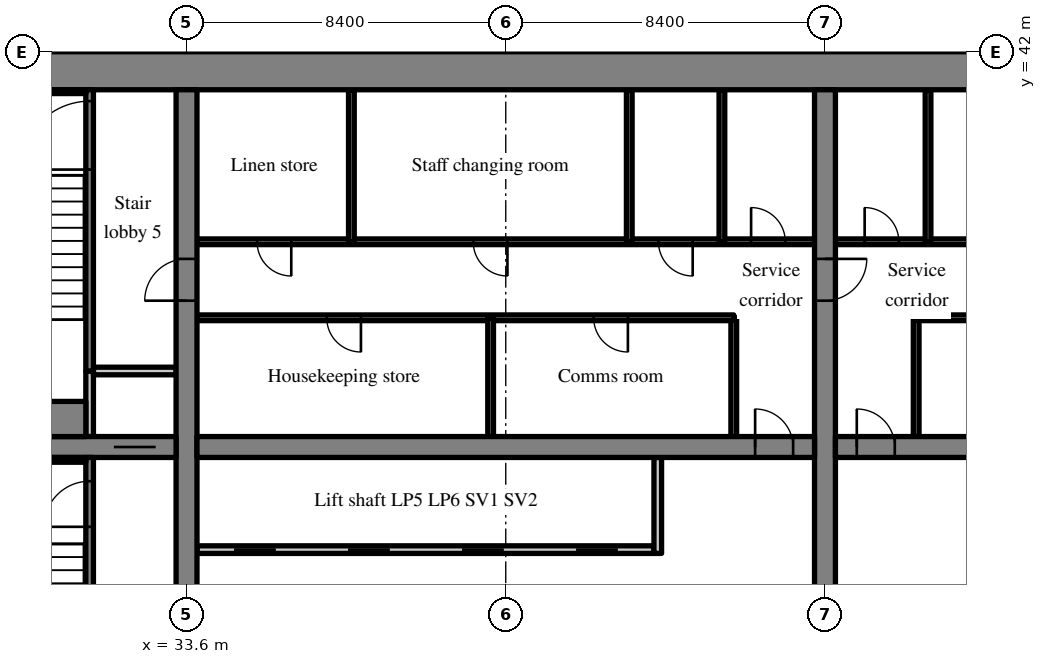
"""IFC4 building model, lengths in metres.
Left out: names, types, materials, properties, quantities, classifications, styles, units other than length and angle.
Written with IfcOpenShell. Run it as: python <this file> out.ifc"""

import sys

from ifc_helpers import new_model, si_unit, direction, frame, frame_2d, origin, place, context, subcontext, project, spatial, rectangle, extrude, source, transform, mapped, element, fill, save


model = new_model("IFC4")
c1 = context("Model", 3, precision=1e-05, world=origin(), true_north=direction((0.0, 1.0)))
c2 = subcontext(c1, "Body", "Model", "MODEL_VIEW")
j1 = project(units=[si_unit("LENGTHUNIT", "METRE"), si_unit("PLANEANGLEUNIT", "RADIAN")], contexts=[c1])
p1 = place(None, origin())
s1 = spatial("IfcSite", under=j1, at=p1, CompositionType="ELEMENT")
p2 = place(p1, origin())
s2 = spatial("IfcBuilding", under=s1, at=p2, CompositionType="ELEMENT")
p3 = place(p2, frame((0.0, 0.0, 77.2)))
s3 = spatial("IfcBuildingStorey", under=s2, at=p3, CompositionType="ELEMENT", Elevation=77.2)
m1 = source(origin(), c2, "Body", "SweptSolid", [
    extrude(rectangle(XDim=50.4, YDim=1.0, at=frame_2d((25.2, 0.0))), origin(), (0.0, 0.0, 1.0), 3.52),
])
p4 = place(p3, frame((25.2, 41.5, 0.0), z_axis=(0.0, 0.0, 1.0), x_axis=(1.0, 0.0, 0.0)))
e1 = element("IfcWall", 1, at=p4, inside=s3, PredefinedType="SHEAR", context=c2, shape_type="MappedRepresentation", body=[
    mapped(m1, transform((0.0, 0.0, 0.0), scale=1.0)),
])
m2 = source(origin(), c2, "Body", "SweptSolid", [
    extrude(rectangle(XDim=18.0, YDim=0.55, at=frame_2d((9.0, 0.0))), origin(), (0.0, 0.0, 1.0), 3.52),
])
p5 = place(p3, frame((33.6, 23.0, 0.0), z_axis=(0.0, 0.0, 1.0), x_axis=(0.0, 1.0, 0.0)))
e2 = element("IfcWall", 2, at=p5, inside=s3, PredefinedType="SHEAR", context=c2, shape_type="MappedRepresentation", body=[
    mapped(m2, transform((0.0, 0.0, 0.0), scale=1.0)),
])
m3 = source(origin(), c2, "Body", "SweptSolid", [
    extrude(rectangle(XDim=1.1, YDim=2.1, at=frame_2d((0.55, 1.05))), frame((0.0, 0.285, 0.0), z_axis=(0.0, -1.0, 0.0), x_axis=(1.0, 0.0, 0.0)), (0.0, 0.0, 1.0), 0.57),
])
p6 = place(p5, frame((12.45, 0.0, 0.0)))
e3 = element("IfcOpeningElement", 3, at=p6, cuts=e2, PredefinedType="OPENING", context=c2, shape_type="MappedRepresentation", body=[
    mapped(m3, transform((0.0, 0.0, 0.0), scale=1.0)),
])
p7 = place(p3, frame((50.4, 23.0, 0.0), z_axis=(0.0, 0.0, 1.0), x_axis=(0.0, 1.0, 0.0)))
e4 = element("IfcWall", 4, at=p7, inside=s3, PredefinedType="SHEAR", context=c2, shape_type="MappedRepresentation", body=[
    mapped(m2, transform((0.0, 0.0, 0.0), scale=1.0)),
])
p8 = place(p7, frame((12.45, 0.0, 0.0)))
e5 = element("IfcOpeningElement", 5, at=p8, cuts=e4, PredefinedType="OPENING", context=c2, shape_type="MappedRepresentation", body=[
    mapped(m3, transform((0.0, 0.0, 0.0), scale=1.0)),
])
m4 = source(origin(), c2, "Body", "SweptSolid", [
    extrude(rectangle(XDim=7.125, YDim=0.55, at=frame_2d((3.562, 0.0))), origin(), (0.0, 0.0, 1.0), 3.52),
])
p9 = place(p3, frame((26.2, 31.6, 0.0), z_axis=(0.0, 0.0, 1.0), x_axis=(1.0, 0.0, 0.0)))
e6 = element("IfcWall", 6, at=p9, inside=s3, PredefinedType="SHEAR", context=c2, shape_type="MappedRepresentation", body=[
    mapped(m4, transform((0.0, 0.0, 0.0), scale=1.0)),
])
p10 = place(p9, frame((5.488, 0.0, 0.0)))
e7 = element("IfcOpeningElement", 7, at=p10, cuts=e6, PredefinedType="OPENING", context=c2, shape_type="MappedRepresentation", body=[
    mapped(m3, transform((0.0, 0.0, 0.0), scale=1.0)),
])
m5 = source(origin(), c2, "Body", "SweptSolid", [
    extrude(rectangle(XDim=16.25, YDim=0.55, at=frame_2d((8.125, 0.0))), origin(), (0.0, 0.0, 1.0), 3.52),
])
p11 = place(p3, frame((33.875, 31.6, 0.0), z_axis=(0.0, 0.0, 1.0), x_axis=(1.0, 0.0, 0.0)))
e8 = element("IfcWall", 8, at=p11, inside=s3, PredefinedType="SHEAR", context=c2, shape_type="MappedRepresentation", body=[
    mapped(m5, transform((0.0, 0.0, 0.0), scale=1.0)),
])
m6 = source(origin(), c2, "Body", "SweptSolid", [
    extrude(rectangle(XDim=1.0, YDim=2.1, at=frame_2d((0.5, 1.05))), frame((0.0, 0.285, 0.0), z_axis=(0.0, -1.0, 0.0), x_axis=(1.0, 0.0, 0.0)), (0.0, 0.0, 1.0), 0.57),
])
p12 = place(p11, frame((14.687, 0.0, 0.0)))
e9 = element("IfcOpeningElement", 9, at=p12, cuts=e8, PredefinedType="OPENING", context=c2, shape_type="MappedRepresentation", body=[
    mapped(m6, transform((0.0, 0.0, 0.0), scale=1.0)),
])
p13 = place(p3, frame((50.675, 31.6, 0.0), z_axis=(0.0, 0.0, 1.0), x_axis=(1.0, 0.0, 0.0)))
e10 = element("IfcWall", 10, at=p13, inside=s3, PredefinedType="SHEAR", context=c2, shape_type="MappedRepresentation", body=[
    mapped(m5, transform((0.0, 0.0, 0.0), scale=1.0)),
])
p14 = place(p13, frame((0.562, 0.0, 0.0)))
e11 = element("IfcOpeningElement", 11, at=p14, cuts=e10, PredefinedType="OPENING", context=c2, shape_type="MappedRepresentation", body=[
    mapped(m6, transform((0.0, 0.0, 0.0), scale=1.0)),
])
m7 = source(origin(), c2, "Body", "SweptSolid", [
    extrude(rectangle(XDim=12.025, YDim=0.2, at=frame_2d((6.012, 0.0))), origin(), (0.0, 0.0, 1.0), 3.52),
])
p15 = place(p3, frame((33.875, 28.9, 0.0), z_axis=(0.0, 0.0, 1.0), x_axis=(1.0, 0.0, 0.0)))
e12 = element("IfcWall", 12, at=p15, inside=s3, PredefinedType="SOLIDWALL", context=c2, shape_type="MappedRepresentation", body=[
    mapped(m7, transform((0.0, 0.0, 0.0), scale=1.0)),
])
m8 = source(origin(), c2, "Body", "SweptSolid", [
    extrude(rectangle(XDim=1.1, YDim=2.1, at=frame_2d((0.55, 1.05))), frame((0.0, 0.11, 0.0), z_axis=(0.0, -1.0, 0.0), x_axis=(1.0, 0.0, 0.0)), (0.0, 0.0, 1.0), 0.22),
])
p16 = place(p15, frame((0.975, 0.0, 0.0)))
e13 = element("IfcOpeningElement", 13, at=p16, cuts=e12, PredefinedType="OPENING", context=c2, shape_type="MappedRepresentation", body=[
    mapped(m8, transform((0.0, 0.0, 0.0), scale=1.0)),
])
p17 = place(p15, frame((3.975, 0.0, 0.0)))
e14 = element("IfcOpeningElement", 14, at=p17, cuts=e12, PredefinedType="OPENING", context=c2, shape_type="MappedRepresentation", body=[
    mapped(m8, transform((0.0, 0.0, 0.0), scale=1.0)),
])
p18 = place(p15, frame((6.975, 0.0, 0.0)))
e15 = element("IfcOpeningElement", 15, at=p18, cuts=e12, PredefinedType="OPENING", context=c2, shape_type="MappedRepresentation", body=[
    mapped(m8, transform((0.0, 0.0, 0.0), scale=1.0)),
])
p19 = place(p15, frame((9.975, 0.0, 0.0)))
e16 = element("IfcOpeningElement", 16, at=p19, cuts=e12, PredefinedType="OPENING", context=c2, shape_type="MappedRepresentation", body=[
    mapped(m8, transform((0.0, 0.0, 0.0), scale=1.0)),
])
m9 = source(origin(), c2, "Body", "SweptSolid", [
    extrude(rectangle(XDim=2.525, YDim=0.2, at=frame_2d((1.262, 0.0))), origin(), (0.0, 0.0, 1.0), 3.52),
])
p20 = place(p3, frame((46.0, 28.8, 0.0), z_axis=(0.0, 0.0, 1.0), x_axis=(0.0, 1.0, 0.0)))
e17 = element("IfcWall", 17, at=p20, inside=s3, PredefinedType="SOLIDWALL", context=c2, shape_type="MappedRepresentation", body=[
    mapped(m9, transform((0.0, 0.0, 0.0), scale=1.0)),
])
m10 = source(origin(), c2, "Body", "SweptSolid", [
    extrude(rectangle(XDim=3.125, YDim=0.15, at=frame_2d((1.562, 0.0))), origin(), (0.0, 0.0, 1.0), 3.52),
])
p21 = place(p3, frame((48.0, 31.875, 0.0), z_axis=(0.0, 0.0, 1.0), x_axis=(0.0, 1.0, 0.0)))
e18 = element("IfcWall", 18, at=p21, inside=s3, PredefinedType="PARTITIONING", context=c2, shape_type="MappedRepresentation", body=[
    mapped(m10, transform((0.0, 0.0, 0.0), scale=1.0)),
])
m11 = source(origin(), c2, "Body", "SweptSolid", [
    extrude(rectangle(XDim=14.125, YDim=0.15, at=frame_2d((7.062, 0.0))), origin(), (0.0, 0.0, 1.0), 3.52),
])
p22 = place(p3, frame((33.875, 35.0, 0.0), z_axis=(0.0, 0.0, 1.0), x_axis=(1.0, 0.0, 0.0)))
e19 = element("IfcWall", 19, at=p22, inside=s3, PredefinedType="PARTITIONING", context=c2, shape_type="MappedRepresentation", body=[
    mapped(m11, transform((0.0, 0.0, 0.0), scale=1.0)),
])
m12 = source(origin(), c2, "Body", "SweptSolid", [
    extrude(rectangle(XDim=0.9, YDim=2.1, at=frame_2d((0.45, 1.05))), frame((0.0, 0.085, 0.0), z_axis=(0.0, -1.0, 0.0), x_axis=(1.0, 0.0, 0.0)), (0.0, 0.0, 1.0), 0.17),
])
p23 = place(p22, frame((3.414, 0.0, 0.0)))
e20 = element("IfcOpeningElement", 20, at=p23, cuts=e19, PredefinedType="OPENING", context=c2, shape_type="MappedRepresentation", body=[
    mapped(m12, transform((0.0, 0.0, 0.0), scale=1.0)),
])
p24 = place(p22, frame((10.439, 0.0, 0.0)))
e21 = element("IfcOpeningElement", 21, at=p24, cuts=e19, PredefinedType="OPENING", context=c2, shape_type="MappedRepresentation", body=[
    mapped(m12, transform((0.0, 0.0, 0.0), scale=1.0)),
])
m13 = source(origin(), c2, "Body", "SweptSolid", [
    extrude(rectangle(XDim=16.25, YDim=0.15, at=frame_2d((8.125, 0.0))), origin(), (0.0, 0.0, 1.0), 3.52),
])
p25 = place(p3, frame((33.875, 37.0, 0.0), z_axis=(0.0, 0.0, 1.0), x_axis=(1.0, 0.0, 0.0)))
e22 = element("IfcWall", 22, at=p25, inside=s3, PredefinedType="PARTITIONING", context=c2, shape_type="MappedRepresentation", body=[
    mapped(m13, transform((0.0, 0.0, 0.0), scale=1.0)),
])
p26 = place(p25, frame((1.581, 0.0, 0.0)))
e23 = element("IfcOpeningElement", 23, at=p26, cuts=e22, PredefinedType="OPENING", context=c2, shape_type="MappedRepresentation", body=[
    mapped(m12, transform((0.0, 0.0, 0.0), scale=1.0)),
])
p27 = place(p25, frame((7.269, 0.0, 0.0)))
e24 = element("IfcOpeningElement", 24, at=p27, cuts=e22, PredefinedType="OPENING", context=c2, shape_type="MappedRepresentation", body=[
    mapped(m12, transform((0.0, 0.0, 0.0), scale=1.0)),
])
p28 = place(p25, frame((12.144, 0.0, 0.0)))
e25 = element("IfcOpeningElement", 25, at=p28, cuts=e22, PredefinedType="OPENING", context=c2, shape_type="MappedRepresentation", body=[
    mapped(m12, transform((0.0, 0.0, 0.0), scale=1.0)),
])
p29 = place(p25, frame((14.581, 0.0, 0.0)))
e26 = element("IfcOpeningElement", 26, at=p29, cuts=e22, PredefinedType="OPENING", context=c2, shape_type="MappedRepresentation", body=[
    mapped(m12, transform((0.0, 0.0, 0.0), scale=1.0)),
])
p30 = place(p3, frame((41.602, 31.875, 0.0), z_axis=(0.0, 0.0, 1.0), x_axis=(0.0, 1.0, 0.0)))
e27 = element("IfcWall", 27, at=p30, inside=s3, PredefinedType="PARTITIONING", context=c2, shape_type="MappedRepresentation", body=[
    mapped(m10, transform((0.0, 0.0, 0.0), scale=1.0)),
])
m14 = source(origin(), c2, "Body", "SweptSolid", [
    extrude(rectangle(XDim=4.0, YDim=0.15, at=frame_2d((2.0, 0.0))), origin(), (0.0, 0.0, 1.0), 3.52),
])
for number, where, z_axis, x_axis in (
    (28, (37.938, 37.0, 0.0), (0.0, 0.0, 1.0), (0.0, 1.0, 0.0)),
    (29, (45.25, 37.0, 0.0), (0.0, 0.0, 1.0), (0.0, 1.0, 0.0)),
    (30, (47.688, 37.0, 0.0), (0.0, 0.0, 1.0), (0.0, 1.0, 0.0)),
):
    element("IfcWall", number, at=place(p3, frame(where, z_axis=z_axis, x_axis=x_axis)), inside=s3, PredefinedType="PARTITIONING", context=c2, shape_type="MappedRepresentation", body=[
        mapped(m14, transform((0.0, 0.0, 0.0), scale=1.0)),
    ])
p31 = place(p3, frame((52.8, 31.875, 0.0), z_axis=(0.0, 0.0, 1.0), x_axis=(0.0, 1.0, 0.0)))
e31 = element("IfcWall", 31, at=p31, inside=s3, PredefinedType="PARTITIONING", context=c2, shape_type="MappedRepresentation", body=[
    mapped(m10, transform((0.0, 0.0, 0.0), scale=1.0)),
])
p32 = place(p3, frame((66.925, 35.0, 0.0), z_axis=(0.0, 0.0, 1.0), x_axis=(-1.0, 0.0, 0.0)))
e32 = element("IfcWall", 32, at=p32, inside=s3, PredefinedType="PARTITIONING", context=c2, shape_type="MappedRepresentation", body=[
    mapped(m11, transform((0.0, 0.0, 0.0), scale=1.0)),
])
p33 = place(p32, frame((6.575, 0.0, 0.0)))
e33 = element("IfcOpeningElement", 33, at=p33, cuts=e32, PredefinedType="OPENING", context=c2, shape_type="MappedRepresentation", body=[
    mapped(m12, transform((0.0, 0.0, 0.0), scale=1.0)),
])
p34 = place(p3, frame((66.925, 37.0, 0.0), z_axis=(0.0, 0.0, 1.0), x_axis=(-1.0, 0.0, 0.0)))
e34 = element("IfcWall", 34, at=p34, inside=s3, PredefinedType="PARTITIONING", context=c2, shape_type="MappedRepresentation", body=[
    mapped(m13, transform((0.0, 0.0, 0.0), scale=1.0)),
])
p35 = place(p34, frame((3.206, 0.0, 0.0)))
e35 = element("IfcOpeningElement", 35, at=p35, cuts=e34, PredefinedType="OPENING", context=c2, shape_type="MappedRepresentation", body=[
    mapped(m12, transform((0.0, 0.0, 0.0), scale=1.0)),
])
p36 = place(p34, frame((8.081, 0.0, 0.0)))
e36 = element("IfcOpeningElement", 36, at=p36, cuts=e34, PredefinedType="OPENING", context=c2, shape_type="MappedRepresentation", body=[
    mapped(m12, transform((0.0, 0.0, 0.0), scale=1.0)),
])
p37 = place(p34, frame((11.331, 0.0, 0.0)))
e37 = element("IfcOpeningElement", 37, at=p37, cuts=e34, PredefinedType="OPENING", context=c2, shape_type="MappedRepresentation", body=[
    mapped(m12, transform((0.0, 0.0, 0.0), scale=1.0)),
])
p38 = place(p34, frame((14.581, 0.0, 0.0)))
e38 = element("IfcOpeningElement", 38, at=p38, cuts=e34, PredefinedType="OPENING", context=c2, shape_type="MappedRepresentation", body=[
    mapped(m12, transform((0.0, 0.0, 0.0), scale=1.0)),
])
p39 = place(p3, frame((53.112, 37.0, 0.0), z_axis=(0.0, 0.0, 1.0), x_axis=(0.0, 1.0, 0.0)))
e39 = element("IfcWall", 39, at=p39, inside=s3, PredefinedType="PARTITIONING", context=c2, shape_type="MappedRepresentation", body=[
    mapped(m14, transform((0.0, 0.0, 0.0), scale=1.0)),
])
m15 = source(origin(), c2, "Body", "SweptSolid", [
    extrude(rectangle(XDim=8.325, YDim=0.2, at=frame_2d((4.163, 0.0))), origin(), (0.0, 0.0, 1.0), 3.52),
])
p40 = place(p3, frame((31.05, 23.0, 0.0), z_axis=(0.0, 0.0, 1.0), x_axis=(0.0, 1.0, 0.0)))
e40 = element("IfcWall", 40, at=p40, inside=s3, PredefinedType="SOLIDWALL", context=c2, shape_type="MappedRepresentation", body=[
    mapped(m15, transform((0.0, 0.0, 0.0), scale=1.0)),
])
m16 = source(origin(), c2, "Body", "SweptSolid", [
    extrude(rectangle(XDim=1.2, YDim=2.1, at=frame_2d((0.6, 1.05))), frame((0.0, 0.11, 0.0), z_axis=(0.0, -1.0, 0.0), x_axis=(1.0, 0.0, 0.0)), (0.0, 0.0, 1.0), 0.22),
])
p41 = place(p40, frame((6.5, 0.0, 0.0)))
e41 = element("IfcOpeningElement", 41, at=p41, cuts=e40, PredefinedType="OPENING", context=c2, shape_type="MappedRepresentation", body=[
    mapped(m16, transform((0.0, 0.0, 0.0), scale=1.0)),
])
m17 = source(origin(), c2, "Body", "SweptSolid", [
    extrude(rectangle(XDim=1.725, YDim=0.2, at=frame_2d((0.863, 0.0))), origin(), (0.0, 0.0, 1.0), 3.52),
])
p42 = place(p3, frame((31.05, 31.875, 0.0), z_axis=(0.0, 0.0, 1.0), x_axis=(0.0, 1.0, 0.0)))
e42 = element("IfcWall", 42, at=p42, inside=s3, PredefinedType="SOLIDWALL", context=c2, shape_type="MappedRepresentation", body=[
    mapped(m17, transform((0.0, 0.0, 0.0), scale=1.0)),
])
m18 = source(origin(), c2, "Body", "SweptSolid", [
    extrude(rectangle(XDim=2.175, YDim=0.2, at=frame_2d((1.087, 0.0))), origin(), (0.0, 0.0, 1.0), 3.52),
])
p43 = place(p3, frame((31.15, 33.6, 0.0), z_axis=(0.0, 0.0, 1.0), x_axis=(1.0, 0.0, 0.0)))
e43 = element("IfcWall", 43, at=p43, inside=s3, PredefinedType="SOLIDWALL", context=c2, shape_type="MappedRepresentation", body=[
    mapped(m18, transform((0.0, 0.0, 0.0), scale=1.0)),
])
m19 = source(origin(), c2, "Body", "SweptSolid", [
    extrude(rectangle(XDim=7.4, YDim=0.2, at=frame_2d((3.7, 0.0))), origin(), (0.0, 0.0, 1.0), 3.52),
])
p44 = place(p3, frame((31.05, 33.6, 0.0), z_axis=(0.0, 0.0, 1.0), x_axis=(0.0, 1.0, 0.0)))
e44 = element("IfcWall", 44, at=p44, inside=s3, PredefinedType="SOLIDWALL", context=c2, shape_type="MappedRepresentation", body=[
    mapped(m19, transform((0.0, 0.0, 0.0), scale=1.0)),
])
m20 = source(origin(), c2, "Body", "SweptSolid", [
    extrude(rectangle(XDim=1.8, YDim=2.1, at=frame_2d((0.9, 1.05))), frame((0.0, 0.11, 0.0), z_axis=(0.0, -1.0, 0.0), x_axis=(1.0, 0.0, 0.0)), (0.0, 0.0, 1.0), 0.22),
])
p45 = place(p44, frame((5.3, 0.0, 0.0)))
e45 = element("IfcOpeningElement", 45, at=p45, cuts=e44, PredefinedType="OPENING", context=c2, shape_type="MappedRepresentation", body=[
    mapped(m20, transform((0.0, 0.0, 0.0), scale=1.0)),
])
m21 = source(origin(), c2, "Body", "SweptSolid", [
    extrude(rectangle(XDim=4.75, YDim=0.125, at=frame_2d((2.375, 0.0))), origin(), (0.0, 0.0, 1.0), 3.52),
])
p46 = place(p3, frame((26.2, 31.262, 0.0), z_axis=(0.0, 0.0, 1.0), x_axis=(1.0, 0.0, 0.0)))
e46 = element("IfcWall", 46, at=p46, inside=s3, PredefinedType="SOLIDWALL", context=c2, shape_type="MappedRepresentation", body=[
    mapped(m21, transform((0.0, 0.0, 0.0), scale=1.0)),
])
m22 = source(origin(), c2, "Body", "SweptSolid", [
    extrude(rectangle(XDim=4.75, YDim=0.1, at=frame_2d((2.375, 0.0))), origin(), (0.0, 0.0, 1.0), 3.52),
])
p47 = place(p3, frame((26.2, 40.95, 0.0), z_axis=(0.0, 0.0, 1.0), x_axis=(1.0, 0.0, 0.0)))
e47 = element("IfcWall", 47, at=p47, inside=s3, PredefinedType="SOLIDWALL", context=c2, shape_type="MappedRepresentation", body=[
    mapped(m22, transform((0.0, 0.0, 0.0), scale=1.0)),
])
m23 = source(origin(), c2, "Body", "SweptSolid", [
    extrude(rectangle(XDim=4.75, YDim=0.925, at=frame_2d((2.375, 0.0))), origin(), (0.0, 0.0, 1.0), 3.52),
])
p48 = place(p3, frame((26.2, 32.337, 0.0), z_axis=(0.0, 0.0, 1.0), x_axis=(1.0, 0.0, 0.0)))
e48 = element("IfcWall", 48, at=p48, inside=s3, PredefinedType="SOLIDWALL", context=c2, shape_type="MappedRepresentation", body=[
    mapped(m23, transform((0.0, 0.0, 0.0), scale=1.0)),
])
m24 = source(origin(), c2, "Body", "SweptSolid", [
    extrude(rectangle(XDim=1.0, YDim=2.1, at=frame_2d((0.5, 1.05))), frame((0.0, 0.025, 0.0), z_axis=(0.0, -1.0, 0.0), x_axis=(1.0, 0.0, 0.0)), (0.0, 0.0, 1.0), 0.05),
])
p49 = place(p12, origin())
e49 = element("IfcDoor", 49, at=p49, inside=s3, OperationType="SINGLE_SWING_LEFT", PredefinedType="DOOR", context=c2, shape_type="MappedRepresentation", body=[
    mapped(m24, transform((0.0, 0.0, 0.0), scale=1.0)),
])
fill(e9, e49)
m25 = source(origin(), c2, "Body", "SweptSolid", [
    extrude(rectangle(XDim=1.1, YDim=2.1, at=frame_2d((0.55, 1.05))), frame((0.0, 0.025, 0.0), z_axis=(0.0, -1.0, 0.0), x_axis=(1.0, 0.0, 0.0)), (0.0, 0.0, 1.0), 0.05),
])
p50 = place(p16, origin())
e50 = element("IfcDoor", 50, at=p50, inside=s3, OperationType="SLIDING_TO_LEFT", PredefinedType="DOOR", context=c2, shape_type="MappedRepresentation", body=[
    mapped(m25, transform((0.0, 0.0, 0.0), scale=1.0)),
])
fill(e13, e50)
p51 = place(p17, origin())
e51 = element("IfcDoor", 51, at=p51, inside=s3, OperationType="SLIDING_TO_RIGHT", PredefinedType="DOOR", context=c2, shape_type="MappedRepresentation", body=[
    mapped(m25, transform((0.0, 0.0, 0.0), scale=1.0)),
])
fill(e14, e51)
p52 = place(p18, origin())
e52 = element("IfcDoor", 52, at=p52, inside=s3, OperationType="SLIDING_TO_LEFT", PredefinedType="DOOR", context=c2, shape_type="MappedRepresentation", body=[
    mapped(m25, transform((0.0, 0.0, 0.0), scale=1.0)),
])
fill(e15, e52)
p53 = place(p19, origin())
e53 = element("IfcDoor", 53, at=p53, inside=s3, OperationType="SLIDING_TO_RIGHT", PredefinedType="DOOR", context=c2, shape_type="MappedRepresentation", body=[
    mapped(m25, transform((0.0, 0.0, 0.0), scale=1.0)),
])
fill(e16, e53)
m26 = source(origin(), c2, "Body", "SweptSolid", [
    extrude(rectangle(XDim=0.9, YDim=2.1, at=frame_2d((0.45, 1.05))), frame((0.0, 0.025, 0.0), z_axis=(0.0, -1.0, 0.0), x_axis=(1.0, 0.0, 0.0)), (0.0, 0.0, 1.0), 0.05),
])
p54 = place(p23, origin())
e54 = element("IfcDoor", 54, at=p54, inside=s3, OperationType="SINGLE_SWING_RIGHT", PredefinedType="DOOR", context=c2, shape_type="MappedRepresentation", body=[
    mapped(m26, transform((0.0, 0.0, 0.0), scale=1.0)),
])
fill(e20, e54)
p55 = place(p24, origin())
e55 = element("IfcDoor", 55, at=p55, inside=s3, OperationType="SINGLE_SWING_RIGHT", PredefinedType="DOOR", context=c2, shape_type="MappedRepresentation", body=[
    mapped(m26, transform((0.0, 0.0, 0.0), scale=1.0)),
])
fill(e21, e55)
p56 = place(p26, origin())
e56 = element("IfcDoor", 56, at=p56, inside=s3, OperationType="SINGLE_SWING_RIGHT", PredefinedType="DOOR", context=c2, shape_type="MappedRepresentation", body=[
    mapped(m26, transform((0.0, 0.0, 0.0), scale=1.0)),
])
fill(e23, e56)
p57 = place(p27, origin())
e57 = element("IfcDoor", 57, at=p57, inside=s3, OperationType="SINGLE_SWING_RIGHT", PredefinedType="DOOR", context=c2, shape_type="MappedRepresentation", body=[
    mapped(m26, transform((0.0, 0.0, 0.0), scale=1.0)),
])
fill(e24, e57)
p58 = place(p28, origin())
e58 = element("IfcDoor", 58, at=p58, inside=s3, OperationType="SINGLE_SWING_RIGHT", PredefinedType="DOOR", context=c2, shape_type="MappedRepresentation", body=[
    mapped(m26, transform((0.0, 0.0, 0.0), scale=1.0)),
])
fill(e25, e58)
p59 = place(p29, origin())
e59 = element("IfcDoor", 59, at=p59, inside=s3, OperationType="SINGLE_SWING_LEFT", PredefinedType="DOOR", context=c2, shape_type="MappedRepresentation", body=[
    mapped(m26, transform((0.0, 0.0, 0.0), scale=1.0)),
])
fill(e26, e59)
p60 = place(p14, origin())
e60 = element("IfcDoor", 60, at=p60, inside=s3, OperationType="SINGLE_SWING_LEFT", PredefinedType="DOOR", context=c2, shape_type="MappedRepresentation", body=[
    mapped(m24, transform((0.0, 0.0, 0.0), scale=1.0)),
])
fill(e11, e60)
p61 = place(p38, origin())
e61 = element("IfcDoor", 61, at=p61, inside=s3, OperationType="SINGLE_SWING_RIGHT", PredefinedType="DOOR", context=c2, shape_type="MappedRepresentation", body=[
    mapped(m26, transform((0.0, 0.0, 0.0), scale=1.0)),
])
fill(e38, e61)
m27 = source(origin(), c2, "Body", "SweptSolid", [
    extrude(rectangle(XDim=1.2, YDim=2.1, at=frame_2d((0.6, 1.05))), frame((0.0, 0.025, 0.0), z_axis=(0.0, -1.0, 0.0), x_axis=(1.0, 0.0, 0.0)), (0.0, 0.0, 1.0), 0.05),
])
p62 = place(p41, origin())
e62 = element("IfcDoor", 62, at=p62, inside=s3, OperationType="SINGLE_SWING_LEFT", PredefinedType="DOOR", context=c2, shape_type="MappedRepresentation", body=[
    mapped(m27, transform((0.0, 0.0, 0.0), scale=1.0)),
])
fill(e41, e62)
p63 = place(p10, origin())
e63 = element("IfcDoor", 63, at=p63, inside=s3, OperationType="SLIDING_TO_RIGHT", PredefinedType="DOOR", context=c2, shape_type="MappedRepresentation", body=[
    mapped(m25, transform((0.0, 0.0, 0.0), scale=1.0)),
])
fill(e7, e63)
m28 = source(origin(), c2, "Body", "SweptSolid", [
    extrude(rectangle(XDim=1.8, YDim=2.1, at=frame_2d((0.9, 1.05))), frame((0.0, 0.025, 0.0), z_axis=(0.0, -1.0, 0.0), x_axis=(1.0, 0.0, 0.0)), (0.0, 0.0, 1.0), 0.05),
])
p64 = place(p45, origin())
e64 = element("IfcDoor", 64, at=p64, inside=s3, OperationType="SINGLE_SWING_LEFT", PredefinedType="DOOR", context=c2, shape_type="MappedRepresentation", body=[
    mapped(m28, transform((0.0, 0.0, 0.0), scale=1.0)),
])
fill(e45, e64)
p65 = place(p6, origin())
e65 = element("IfcDoor", 65, at=p65, inside=s3, OperationType="SINGLE_SWING_LEFT", PredefinedType="DOOR", context=c2, shape_type="MappedRepresentation", body=[
    mapped(m25, transform((0.0, 0.0, 0.0), scale=1.0)),
])
fill(e3, e65)
p66 = place(p8, origin())
e66 = element("IfcDoor", 66, at=p66, inside=s3, OperationType="SINGLE_SWING_RIGHT", PredefinedType="DOOR", context=c2, shape_type="MappedRepresentation", body=[
    mapped(m25, transform((0.0, 0.0, 0.0), scale=1.0)),
])
fill(e5, e66)
save(model, sys.argv[1])
